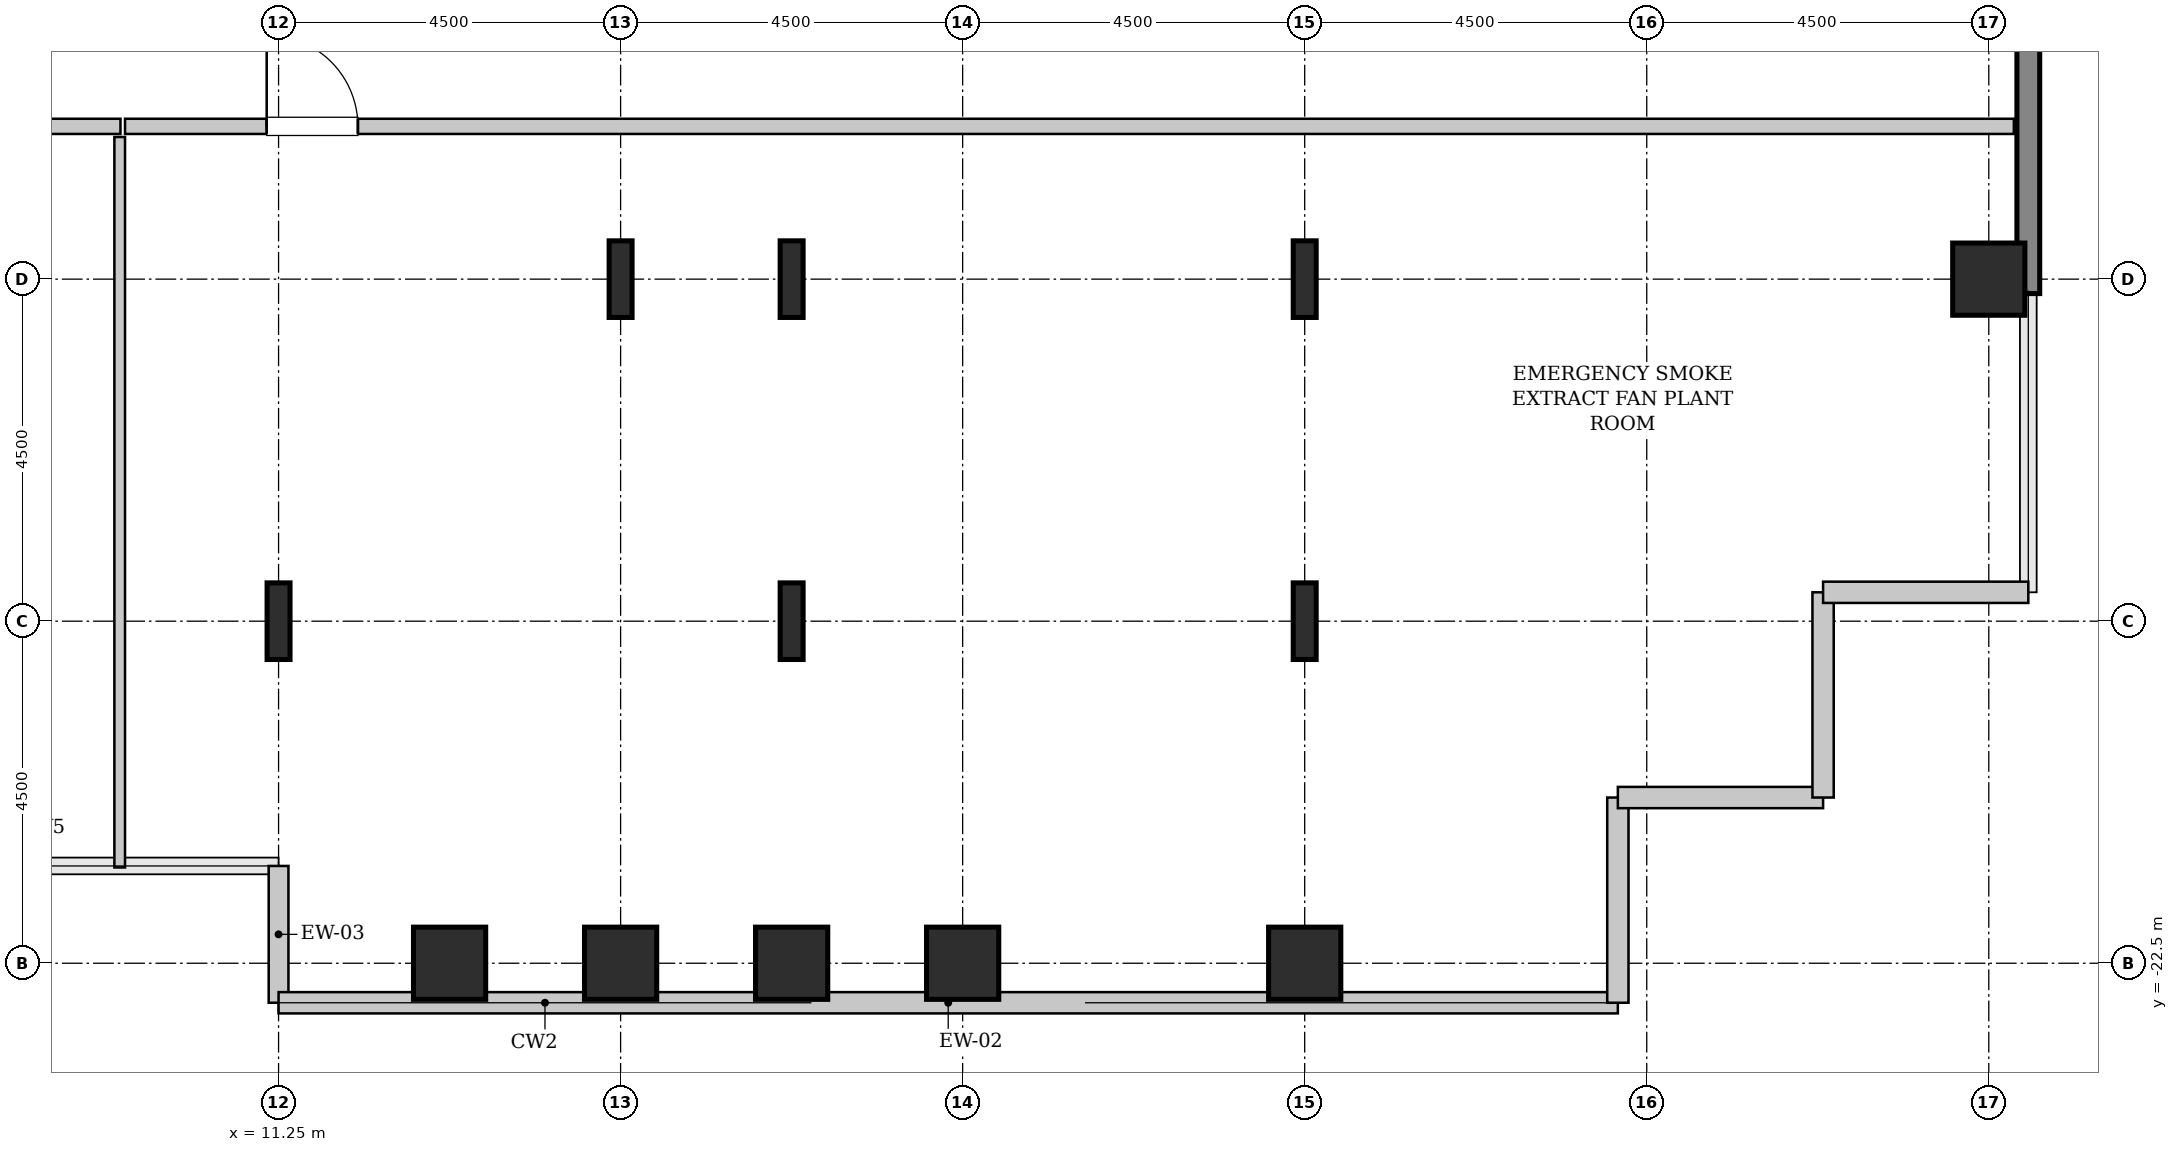
"""IFC4 building model, lengths in metres.
Left out: names, types, materials, properties, quantities, classifications, styles, units other than length and angle.
Written with IfcOpenShell. Run it as: python <this file> out.ifc"""

import sys

from ifc_helpers import new_model, si_unit, direction, frame, frame_2d, origin, origin_2d, place, context, subcontext, project, spatial, rectangle, hollow_rectangle, i_section, extrude, source, transform, mapped, element, fill, save


model = new_model("IFC4")
c1 = context("Model", 3, precision=1e-05, world=origin(), true_north=direction((0.0, 1.0)))
c2 = subcontext(c1, "Body", "Model", "MODEL_VIEW")
j1 = project(units=[si_unit("LENGTHUNIT", "METRE"), si_unit("PLANEANGLEUNIT", "RADIAN")], contexts=[c1])
p1 = place(None, origin())
s1 = spatial("IfcSite", under=j1, at=p1, CompositionType="ELEMENT")
p2 = place(p1, origin())
s2 = spatial("IfcBuilding", under=s1, at=p2, CompositionType="ELEMENT")
p3 = place(p2, frame((0.0, 0.0, 86.2)))
s3 = spatial("IfcBuildingStorey", under=s2, at=p3, CompositionType="ELEMENT", Elevation=86.2)
m1 = source(origin(), c2, "Body", "SweptSolid", [
    extrude(i_section(OverallWidth=0.302, OverallDepth=1.008, WebThickness=0.021, FlangeThickness=0.04, FilletRadius=0.03, at=origin_2d()), origin(), (0.0, 0.0, 1.0), 4.6),
])
p4 = place(p3, frame((11.25, -18.0, 0.0), z_axis=(0.0, 0.0, 1.0), x_axis=(1.0, 0.0, 0.0)))
e1 = element("IfcColumn", 1, at=p4, inside=s3, PredefinedType="COLUMN", context=c2, shape_type="MappedRepresentation", body=[
    mapped(m1, transform((0.0, 0.0, 0.0), x_axis=(1.0, 0.0, 0.0), y_axis=(0.0, 1.0, 0.0), z_axis=(0.0, 0.0, 1.0), scale=1.0)),
])
m2 = source(origin(), c2, "Body", "SweptSolid", [
    extrude(hollow_rectangle(XDim=0.95, YDim=0.95, WallThickness=0.045, InnerFilletRadius=0.045, OuterFilletRadius=0.09, at=origin_2d()), origin(), (0.0, 0.0, 1.0), 4.6),
])
for number, where, z_axis, x_axis in (
    (2, (13.5, -22.5, 0.0), (0.0, 0.0, 1.0), (1.0, 0.0, 0.0)),
    (3, (15.75, -22.5, 0.0), (0.0, 0.0, 1.0), (1.0, 0.0, 0.0)),
):
    element("IfcColumn", number, at=place(p3, frame(where, z_axis=z_axis, x_axis=x_axis)), inside=s3, PredefinedType="COLUMN", context=c2, shape_type="MappedRepresentation", body=[
        mapped(m2, transform((0.0, 0.0, 0.0), x_axis=(1.0, 0.0, 0.0), y_axis=(0.0, 1.0, 0.0), z_axis=(0.0, 0.0, 1.0), scale=1.0)),
    ])
p5 = place(p3, frame((15.75, -13.5, 0.0), z_axis=(0.0, 0.0, 1.0), x_axis=(1.0, 0.0, 0.0)))
e4 = element("IfcColumn", 4, at=p5, inside=s3, PredefinedType="COLUMN", context=c2, shape_type="MappedRepresentation", body=[
    mapped(m1, transform((0.0, 0.0, 0.0), x_axis=(1.0, 0.0, 0.0), y_axis=(0.0, 1.0, 0.0), z_axis=(0.0, 0.0, 1.0), scale=1.0)),
])
p6 = place(p3, frame((18.0, -22.5, 0.0), z_axis=(0.0, 0.0, 1.0), x_axis=(1.0, 0.0, 0.0)))
e5 = element("IfcColumn", 5, at=p6, inside=s3, PredefinedType="COLUMN", context=c2, shape_type="MappedRepresentation", body=[
    mapped(m2, transform((0.0, 0.0, 0.0), x_axis=(1.0, 0.0, 0.0), y_axis=(0.0, 1.0, 0.0), z_axis=(0.0, 0.0, 1.0), scale=1.0)),
])
for number, where, z_axis, x_axis in (
    (6, (18.0, -18.0, 0.0), (0.0, 0.0, 1.0), (1.0, 0.0, 0.0)),
    (7, (18.0, -13.5, 0.0), (0.0, 0.0, 1.0), (1.0, 0.0, 0.0)),
):
    element("IfcColumn", number, at=place(p3, frame(where, z_axis=z_axis, x_axis=x_axis)), inside=s3, PredefinedType="COLUMN", context=c2, shape_type="MappedRepresentation", body=[
        mapped(m1, transform((0.0, 0.0, 0.0), x_axis=(1.0, 0.0, 0.0), y_axis=(0.0, 1.0, 0.0), z_axis=(0.0, 0.0, 1.0), scale=1.0)),
    ])
for number, where, z_axis, x_axis in (
    (8, (20.25, -22.5, 0.0), (0.0, 0.0, 1.0), (1.0, 0.0, 0.0)),
    (9, (24.75, -22.5, 0.0), (0.0, 0.0, 1.0), (1.0, 0.0, 0.0)),
):
    element("IfcColumn", number, at=place(p3, frame(where, z_axis=z_axis, x_axis=x_axis)), inside=s3, PredefinedType="COLUMN", context=c2, shape_type="MappedRepresentation", body=[
        mapped(m2, transform((0.0, 0.0, 0.0), x_axis=(1.0, 0.0, 0.0), y_axis=(0.0, 1.0, 0.0), z_axis=(0.0, 0.0, 1.0), scale=1.0)),
    ])
for number, where, z_axis, x_axis in (
    (10, (24.75, -18.0, 0.0), (0.0, 0.0, 1.0), (1.0, 0.0, 0.0)),
    (11, (24.75, -13.5, 0.0), (0.0, 0.0, 1.0), (1.0, 0.0, 0.0)),
):
    element("IfcColumn", number, at=place(p3, frame(where, z_axis=z_axis, x_axis=x_axis)), inside=s3, PredefinedType="COLUMN", context=c2, shape_type="MappedRepresentation", body=[
        mapped(m1, transform((0.0, 0.0, 0.0), x_axis=(1.0, 0.0, 0.0), y_axis=(0.0, 1.0, 0.0), z_axis=(0.0, 0.0, 1.0), scale=1.0)),
    ])
p7 = place(p3, frame((33.75, -13.5, 0.0), z_axis=(0.0, 0.0, 1.0), x_axis=(1.0, 0.0, 0.0)))
e12 = element("IfcColumn", 12, at=p7, inside=s3, PredefinedType="COLUMN", context=c2, shape_type="MappedRepresentation", body=[
    mapped(m2, transform((0.0, 0.0, 0.0), x_axis=(1.0, 0.0, 0.0), y_axis=(0.0, 1.0, 0.0), z_axis=(0.0, 0.0, 1.0), scale=1.0)),
])
m3 = source(origin(), c2, "Body", "SweptSolid", [
    extrude(rectangle(XDim=9.38, YDim=0.3, at=frame_2d((4.69, 0.0))), origin(), (0.0, 0.0, 1.0), 4.35),
])
p8 = place(p3, frame((34.27, -13.69, 0.0), z_axis=(0.0, 0.0, 1.0), x_axis=(0.0, 1.0, 0.0)))
e13 = element("IfcWall", 13, at=p8, inside=s3, PredefinedType="SHEAR", context=c2, shape_type="MappedRepresentation", body=[
    mapped(m3, transform((0.0, 0.0, 0.0), x_axis=(1.0, 0.0, 0.0), y_axis=(0.0, 1.0, 0.0), z_axis=(0.0, 0.0, 1.0), scale=1.0)),
])
m4 = source(origin(), c2, "Body", "SweptSolid", [
    extrude(rectangle(XDim=1.8, YDim=0.26, at=frame_2d((0.9, 0.0))), origin(), (0.0, 0.0, 1.0), 4.35),
])
p9 = place(p3, frame((11.25, -21.22, 0.0), z_axis=(0.0, 0.0, 1.0), x_axis=(0.0, -1.0, 0.0)))
e14 = element("IfcWall", 14, at=p9, inside=s3, PredefinedType="SOLIDWALL", context=c2, shape_type="MappedRepresentation", body=[
    mapped(m4, transform((0.0, 0.0, 0.0), x_axis=(1.0, 0.0, 0.0), y_axis=(0.0, 1.0, 0.0), z_axis=(0.0, 0.0, 1.0), scale=1.0)),
])
m5 = source(origin(), c2, "Body", "SweptSolid", [
    extrude(rectangle(XDim=17.62, YDim=0.28, at=frame_2d((8.81, 0.0))), origin(), (0.0, 0.0, 1.0), 1.1),
])
p10 = place(p3, frame((11.25, -23.02, 0.0), z_axis=(0.0, 0.0, 1.0), x_axis=(1.0, 0.0, 0.0)))
e15 = element("IfcWall", 15, at=p10, inside=s3, PredefinedType="SOLIDWALL", context=c2, shape_type="MappedRepresentation", body=[
    mapped(m5, transform((0.0, 0.0, 0.0), x_axis=(1.0, 0.0, 0.0), y_axis=(0.0, 1.0, 0.0), z_axis=(0.0, 0.0, 1.0), scale=1.0)),
])
m6 = source(origin(), c2, "Body", "SweptSolid", [
    extrude(rectangle(XDim=2.7, YDim=0.28, at=frame_2d((1.35, 0.0))), origin(), (0.0, 0.0, 1.0), 4.35),
])
for number, where, z_axis, x_axis in (
    (16, (28.87, -23.02, 0.0), (0.0, 0.0, 1.0), (0.0, 1.0, 0.0)),
    (17, (28.87, -20.32, 0.0), (0.0, 0.0, 1.0), (1.0, 0.0, 0.0)),
    (18, (31.57, -20.32, 0.0), (0.0, 0.0, 1.0), (0.0, 1.0, 0.0)),
    (19, (31.57, -17.62, 0.0), (0.0, 0.0, 1.0), (1.0, 0.0, 0.0)),
):
    element("IfcWall", number, at=place(p3, frame(where, z_axis=z_axis, x_axis=x_axis)), inside=s3, PredefinedType="SOLIDWALL", context=c2, shape_type="MappedRepresentation", body=[
        mapped(m6, transform((0.0, 0.0, 0.0), x_axis=(1.0, 0.0, 0.0), y_axis=(0.0, 1.0, 0.0), z_axis=(0.0, 0.0, 1.0), scale=1.0)),
    ])
m7 = source(origin(), c2, "Body", "SweptSolid", [
    extrude(rectangle(XDim=4.54, YDim=0.2, at=frame_2d((2.27, 0.0))), origin(), (0.0, 0.0, 1.0), 4.335),
])
p11 = place(p3, frame((4.63, -11.49, 0.0), z_axis=(0.0, 0.0, 1.0), x_axis=(1.0, 0.0, 0.0)))
e20 = element("IfcWall", 20, at=p11, inside=s3, PredefinedType="SOLIDWALL", context=c2, shape_type="MappedRepresentation", body=[
    mapped(m7, transform((0.0, 0.0, 0.0), x_axis=(1.0, 0.0, 0.0), y_axis=(0.0, 1.0, 0.0), z_axis=(0.0, 0.0, 1.0), scale=1.0)),
])
p12 = place(p11, frame((1.67, 0.0, 0.0)))
e21 = element("IfcOpeningElement", 21, at=p12, cuts=e20, PredefinedType="OPENING", context=c2, shape_type="SweptSolid", body=[
    extrude(rectangle(XDim=1.2, YDim=2.15, at=frame_2d((0.6, 1.075))), frame((0.0, 0.11, 0.0), z_axis=(0.0, -1.0, 0.0), x_axis=(1.0, 0.0, 0.0)), (0.0, 0.0, 1.0), 0.22),
])
m8 = source(origin(), c2, "Body", "SweptSolid", [
    extrude(rectangle(XDim=9.61, YDim=0.14, at=frame_2d((4.805, 0.0))), origin(), (0.0, 0.0, 1.0), 4.335),
])
p13 = place(p3, frame((9.16, -21.24, 0.0), z_axis=(0.0, 0.0, 1.0), x_axis=(0.0, 1.0, 0.0)))
e22 = element("IfcWall", 22, at=p13, inside=s3, PredefinedType="PARTITIONING", context=c2, shape_type="MappedRepresentation", body=[
    mapped(m8, transform((0.0, 0.0, 0.0), x_axis=(1.0, 0.0, 0.0), y_axis=(0.0, 1.0, 0.0), z_axis=(0.0, 0.0, 1.0), scale=1.0)),
])
m9 = source(origin(), c2, "Body", "SweptSolid", [
    extrude(rectangle(XDim=24.85, YDim=0.2, at=frame_2d((12.425, 0.0))), origin(), (0.0, 0.0, 1.0), 4.335),
])
p14 = place(p3, frame((9.23, -11.49, 0.0), z_axis=(0.0, 0.0, 1.0), x_axis=(1.0, 0.0, 0.0)))
e23 = element("IfcWall", 23, at=p14, inside=s3, PredefinedType="SOLIDWALL", context=c2, shape_type="MappedRepresentation", body=[
    mapped(m9, transform((0.0, 0.0, 0.0), x_axis=(1.0, 0.0, 0.0), y_axis=(0.0, 1.0, 0.0), z_axis=(0.0, 0.0, 1.0), scale=1.0)),
])
p15 = place(p14, frame((1.864, 0.0, 0.0)))
e24 = element("IfcOpeningElement", 24, at=p15, cuts=e23, PredefinedType="OPENING", context=c2, shape_type="SweptSolid", body=[
    extrude(rectangle(XDim=1.2, YDim=2.15, at=frame_2d((0.6, 1.075))), frame((0.0, 0.11, 0.0), z_axis=(0.0, -1.0, 0.0), x_axis=(1.0, 0.0, 0.0)), (0.0, 0.0, 1.0), 0.22),
])
m10 = source(origin(), c2, "Body", "SweptSolid", [
    extrude(rectangle(XDim=1.2, YDim=2.15, at=frame_2d((0.6, 1.075))), frame((0.0, 0.025, 0.0), z_axis=(0.0, -1.0, 0.0), x_axis=(1.0, 0.0, 0.0)), (0.0, 0.0, 1.0), 0.05),
])
p16 = place(p15, origin())
e25 = element("IfcDoor", 25, at=p16, inside=s3, OperationType="SINGLE_SWING_LEFT", PredefinedType="DOOR", context=c2, shape_type="MappedRepresentation", body=[
    mapped(m10, transform((0.0, 0.0, 0.0), x_axis=(1.0, 0.0, 0.0), y_axis=(0.0, 1.0, 0.0), z_axis=(0.0, 0.0, 1.0), scale=1.0)),
])
fill(e24, e25)
save(model, sys.argv[1])
